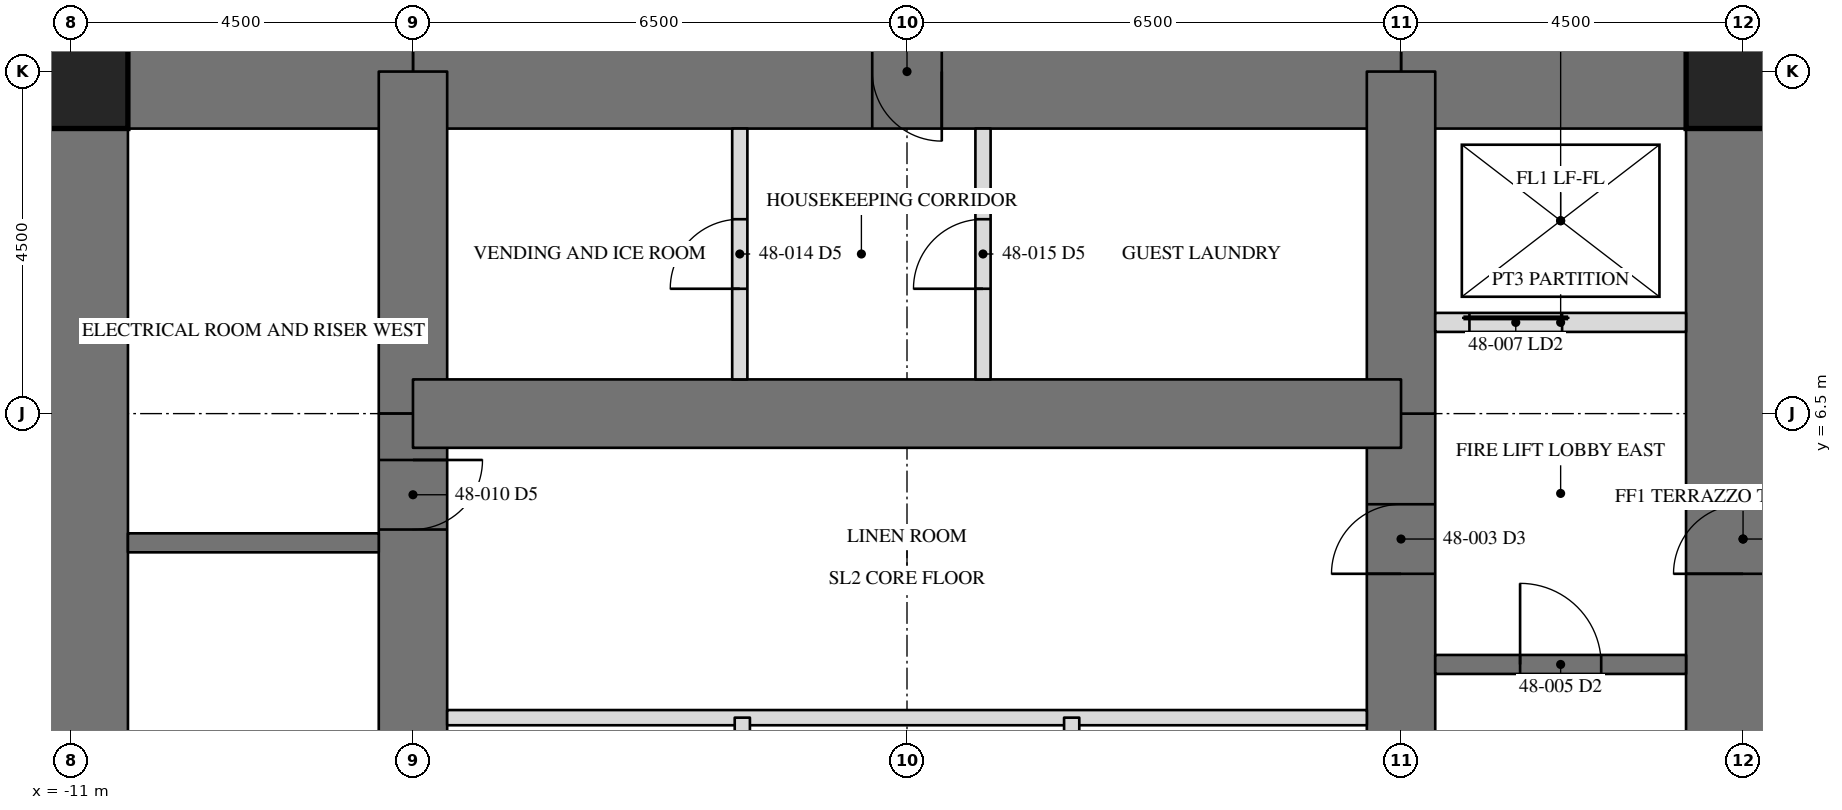
"""IFC4 building model, lengths in metres.
Left out: names, types, materials, properties, quantities, classifications, styles, units other than length and angle.
Written with IfcOpenShell. Run it as: python <this file> out.ifc"""

import sys

from ifc_helpers import new_model, si_unit, direction, frame, frame_2d, origin, origin_2d, place, context, subcontext, project, spatial, rectangle, hollow_rectangle, extrude, element, fill, save


model = new_model("IFC4")
c1 = context("Model", 3, precision=1e-05, world=origin(), true_north=direction((0.0, 1.0)))
c2 = subcontext(c1, "Body", "Model", "MODEL_VIEW")
j1 = project(units=[si_unit("LENGTHUNIT", "METRE"), si_unit("PLANEANGLEUNIT", "RADIAN")], contexts=[c1])
p1 = place(None, origin())
s1 = spatial("IfcSite", under=j1, at=p1, CompositionType="ELEMENT")
p2 = place(p1, origin())
s2 = spatial("IfcBuilding", under=s1, at=p2, CompositionType="ELEMENT")
p3 = place(p2, frame((0.0, 0.0, 204.7)))
s3 = spatial("IfcBuildingStorey", under=s2, at=p3, CompositionType="ELEMENT", Elevation=204.7)
p4 = place(p3, frame((11.0, -11.0, 0.0), z_axis=(0.0, 0.0, 1.0), x_axis=(0.0, 1.0, 0.0)))
e1 = element("IfcWall", 1, at=p4, inside=s3, PredefinedType="SHEAR", context=c2, shape_type="SweptSolid", body=[
    extrude(rectangle(XDim=22.0, YDim=1.5, at=frame_2d((11.0, 0.0))), origin(), (0.0, 0.0, 1.0), 3.5),
])
p5 = place(p4, frame((15.393, 0.0, 0.0)))
e2 = element("IfcOpeningElement", 2, at=p5, cuts=e1, PredefinedType="OPENING", context=c2, shape_type="SweptSolid", body=[
    extrude(rectangle(XDim=0.915, YDim=2.134, at=frame_2d((0.458, 1.067))), frame((0.0, 0.76, 0.0), z_axis=(0.0, -1.0, 0.0), x_axis=(1.0, 0.0, 0.0)), (0.0, 0.0, 1.0), 1.52),
])
p6 = place(p3, frame((-11.0, 11.0, 0.0), z_axis=(0.0, 0.0, 1.0), x_axis=(0.0, -1.0, 0.0)))
e3 = element("IfcWall", 3, at=p6, inside=s3, PredefinedType="SHEAR", context=c2, shape_type="SweptSolid", body=[
    extrude(rectangle(XDim=22.0, YDim=1.5, at=frame_2d((11.0, 0.0))), origin(), (0.0, 0.0, 1.0), 3.5),
])
p7 = place(p6, frame((15.393, 0.0, 0.0)))
e4 = element("IfcOpeningElement", 4, at=p7, cuts=e3, PredefinedType="OPENING", context=c2, shape_type="SweptSolid", body=[
    extrude(rectangle(XDim=0.915, YDim=2.134, at=frame_2d((0.458, 1.067))), frame((0.0, 0.76, 0.0), z_axis=(0.0, -1.0, 0.0), x_axis=(1.0, 0.0, 0.0)), (0.0, 0.0, 1.0), 1.52),
])
p8 = place(p3, frame((11.0, 11.0, 0.0), z_axis=(0.0, 0.0, 1.0), x_axis=(-1.0, 0.0, 0.0)))
e5 = element("IfcWall", 5, at=p8, inside=s3, PredefinedType="SHEAR", context=c2, shape_type="SweptSolid", body=[
    extrude(rectangle(XDim=4.5, YDim=1.5, at=frame_2d((2.25, 0.0))), origin(), (0.0, 0.0, 1.0), 3.5),
])
p9 = place(p3, frame((6.5, 11.0, 0.0), z_axis=(0.0, 0.0, 1.0), x_axis=(-1.0, 0.0, 0.0)))
e6 = element("IfcWall", 6, at=p9, inside=s3, PredefinedType="SHEAR", context=c2, shape_type="SweptSolid", body=[
    extrude(rectangle(XDim=13.0, YDim=1.5, at=frame_2d((6.5, 0.0))), origin(), (0.0, 0.0, 1.0), 3.5),
])
p10 = place(p9, frame((6.042, 0.0, 0.0)))
e7 = element("IfcOpeningElement", 7, at=p10, cuts=e6, PredefinedType="OPENING", context=c2, shape_type="SweptSolid", body=[
    extrude(rectangle(XDim=0.915, YDim=2.134, at=frame_2d((0.458, 1.067))), frame((0.0, 0.76, 0.0), z_axis=(0.0, -1.0, 0.0), x_axis=(1.0, 0.0, 0.0)), (0.0, 0.0, 1.0), 1.52),
])
p11 = place(p3, frame((-6.5, 11.0, 0.0), z_axis=(0.0, 0.0, 1.0), x_axis=(-1.0, 0.0, 0.0)))
e8 = element("IfcWall", 8, at=p11, inside=s3, PredefinedType="SHEAR", context=c2, shape_type="SweptSolid", body=[
    extrude(rectangle(XDim=4.5, YDim=1.5, at=frame_2d((2.25, 0.0))), origin(), (0.0, 0.0, 1.0), 3.5),
])
p12 = place(p3, frame((6.5, -6.5, 0.0), z_axis=(0.0, 0.0, 1.0), x_axis=(0.0, 1.0, 0.0)))
e9 = element("IfcWall", 9, at=p12, inside=s3, PredefinedType="SHEAR", context=c2, shape_type="SweptSolid", body=[
    extrude(rectangle(XDim=13.0, YDim=0.9, at=frame_2d((6.5, 0.0))), origin(), (0.0, 0.0, 1.0), 3.5),
])
p13 = place(p12, frame((10.893, 0.0, 0.0)))
e10 = element("IfcOpeningElement", 10, at=p13, cuts=e9, PredefinedType="OPENING", context=c2, shape_type="SweptSolid", body=[
    extrude(rectangle(XDim=0.915, YDim=2.134, at=frame_2d((0.458, 1.067))), frame((0.0, 0.46, 0.0), z_axis=(0.0, -1.0, 0.0), x_axis=(1.0, 0.0, 0.0)), (0.0, 0.0, 1.0), 0.92),
])
p14 = place(p12, frame((0.61, 0.0, 0.0)))
e11 = element("IfcOpeningElement", 11, at=p14, cuts=e9, PredefinedType="OPENING", context=c2, shape_type="SweptSolid", body=[
    extrude(rectangle(XDim=0.915, YDim=2.134, at=frame_2d((0.458, 1.067))), frame((0.0, 0.46, 0.0), z_axis=(0.0, -1.0, 0.0), x_axis=(1.0, 0.0, 0.0)), (0.0, 0.0, 1.0), 0.92),
])
for number, where, z_axis, x_axis in (
    (12, (6.5, 6.5, 0.0), (0.0, 0.0, 1.0), (0.0, 1.0, 0.0)),
    (13, (-6.5, 11.0, 0.0), (0.0, 0.0, 1.0), (0.0, -1.0, 0.0)),
):
    element("IfcWall", number, at=place(p3, frame(where, z_axis=z_axis, x_axis=x_axis)), inside=s3, PredefinedType="SHEAR", context=c2, shape_type="SweptSolid", body=[
        extrude(rectangle(XDim=4.5, YDim=0.9, at=frame_2d((2.25, 0.0))), origin(), (0.0, 0.0, 1.0), 3.5),
    ])
p15 = place(p3, frame((-6.5, 6.5, 0.0), z_axis=(0.0, 0.0, 1.0), x_axis=(0.0, -1.0, 0.0)))
e14 = element("IfcWall", 14, at=p15, inside=s3, PredefinedType="SHEAR", context=c2, shape_type="SweptSolid", body=[
    extrude(rectangle(XDim=13.0, YDim=0.9, at=frame_2d((6.5, 0.0))), origin(), (0.0, 0.0, 1.0), 3.5),
])
p16 = place(p15, frame((10.893, 0.0, 0.0)))
e15 = element("IfcOpeningElement", 15, at=p16, cuts=e14, PredefinedType="OPENING", context=c2, shape_type="SweptSolid", body=[
    extrude(rectangle(XDim=0.915, YDim=2.134, at=frame_2d((0.458, 1.067))), frame((0.0, 0.46, 0.0), z_axis=(0.0, -1.0, 0.0), x_axis=(1.0, 0.0, 0.0)), (0.0, 0.0, 1.0), 0.92),
])
p17 = place(p15, frame((0.61, 0.0, 0.0)))
e16 = element("IfcOpeningElement", 16, at=p17, cuts=e14, PredefinedType="OPENING", context=c2, shape_type="SweptSolid", body=[
    extrude(rectangle(XDim=0.915, YDim=2.134, at=frame_2d((0.458, 1.067))), frame((0.0, 0.46, 0.0), z_axis=(0.0, -1.0, 0.0), x_axis=(1.0, 0.0, 0.0)), (0.0, 0.0, 1.0), 0.92),
])
p18 = place(p3, frame((6.5, 6.5, 0.0), z_axis=(0.0, 0.0, 1.0), x_axis=(-1.0, 0.0, 0.0)))
e17 = element("IfcWall", 17, at=p18, inside=s3, PredefinedType="SHEAR", context=c2, shape_type="SweptSolid", body=[
    extrude(rectangle(XDim=13.0, YDim=0.9, at=frame_2d((6.5, 0.0))), origin(), (0.0, 0.0, 1.0), 3.5),
])
for number, where, z_axis, x_axis in (
    (18, (11.0, 11.0, 0.0), (0.0, 0.0, 1.0), (1.0, 0.0, 0.0)),
    (19, (-11.0, 11.0, 0.0), (0.0, 0.0, 1.0), (1.0, 0.0, 0.0)),
):
    element("IfcColumn", number, at=place(p3, frame(where, z_axis=z_axis, x_axis=x_axis)), inside=s3, PredefinedType="COLUMN", context=c2, shape_type="SweptSolid", body=[
        extrude(hollow_rectangle(XDim=1.499, YDim=1.499, WallThickness=0.102, at=origin_2d()), origin(), (0.0, 0.0, 1.0), 3.5),
    ])
p19 = place(p3, frame((-6.95, 4.8, 0.0), z_axis=(0.0, 0.0, 1.0), x_axis=(-1.0, 0.0, 0.0)))
e20 = element("IfcWall", 20, at=p19, inside=s3, PredefinedType="SOLIDWALL", context=c2, shape_type="SweptSolid", body=[
    extrude(rectangle(XDim=3.3, YDim=0.25, at=frame_2d((1.65, 0.0))), origin(), (0.0, 0.0, 1.0), 3.31),
])
p20 = place(p3, frame((6.95, 3.2, 0.0), z_axis=(0.0, 0.0, 1.0), x_axis=(1.0, 0.0, 0.0)))
e21 = element("IfcWall", 21, at=p20, inside=s3, PredefinedType="SOLIDWALL", context=c2, shape_type="SweptSolid", body=[
    extrude(rectangle(XDim=3.3, YDim=0.25, at=frame_2d((1.65, 0.0))), origin(), (0.0, 0.0, 1.0), 3.31),
])
p21 = place(p20, frame((1.116, 0.0, 0.0)))
e22 = element("IfcOpeningElement", 22, at=p21, cuts=e21, PredefinedType="OPENING", context=c2, shape_type="SweptSolid", body=[
    extrude(rectangle(XDim=1.067, YDim=2.134, at=frame_2d((0.533, 1.067))), frame((0.0, 0.135, 0.0), z_axis=(0.0, -1.0, 0.0), x_axis=(1.0, 0.0, 0.0)), (0.0, 0.0, 1.0), 0.27),
])
p22 = place(p3, frame((6.95, 7.7, 0.0), z_axis=(0.0, 0.0, 1.0), x_axis=(1.0, 0.0, 0.0)))
e23 = element("IfcWall", 23, at=p22, inside=s3, PredefinedType="PARTITIONING", context=c2, shape_type="SweptSolid", body=[
    extrude(rectangle(XDim=3.3, YDim=0.25, at=frame_2d((1.65, 0.0))), origin(), (0.0, 0.0, 1.0), 3.31),
])
p23 = place(p22, frame((0.45, 0.0, 0.0)))
e24 = element("IfcOpeningElement", 24, at=p23, cuts=e23, PredefinedType="OPENING", context=c2, shape_type="SweptSolid", body=[
    extrude(rectangle(XDim=1.219, YDim=2.134, at=frame_2d((0.609, 1.067))), frame((0.0, 0.135, 0.0), z_axis=(0.0, -1.0, 0.0), x_axis=(1.0, 0.0, 0.0)), (0.0, 0.0, 1.0), 0.27),
])
p24 = place(p3, frame((-6.05, 2.5, 0.0), z_axis=(0.0, 0.0, 1.0), x_axis=(1.0, 0.0, 0.0)))
e25 = element("IfcWall", 25, at=p24, inside=s3, PredefinedType="PARTITIONING", context=c2, shape_type="SweptSolid", body=[
    extrude(rectangle(XDim=12.1, YDim=0.2, at=frame_2d((6.05, 0.0))), origin(), (0.0, 0.0, 1.0), 3.31),
])
for number, where, z_axis, x_axis in (
    (26, (-2.167, -2.5, 0.0), (0.0, 0.0, 1.0), (0.0, 1.0, 0.0)),
    (27, (2.167, -2.5, 0.0), (0.0, 0.0, 1.0), (0.0, 1.0, 0.0)),
):
    element("IfcWall", number, at=place(p3, frame(where, z_axis=z_axis, x_axis=x_axis)), inside=s3, PredefinedType="PARTITIONING", context=c2, shape_type="SweptSolid", body=[
        extrude(rectangle(XDim=5.0, YDim=0.2, at=frame_2d((2.5, 0.0))), origin(), (0.0, 0.0, 1.0), 3.31),
    ])
p25 = place(p3, frame((-2.2, 6.95, 0.0), z_axis=(0.0, 0.0, 1.0), x_axis=(0.0, 1.0, 0.0)))
e28 = element("IfcWall", 28, at=p25, inside=s3, PredefinedType="PARTITIONING", context=c2, shape_type="SweptSolid", body=[
    extrude(rectangle(XDim=3.3, YDim=0.2, at=frame_2d((1.65, 0.0))), origin(), (0.0, 0.0, 1.0), 3.31),
])
p26 = place(p25, frame((1.192, 0.0, 0.0)))
e29 = element("IfcOpeningElement", 29, at=p26, cuts=e28, PredefinedType="OPENING", context=c2, shape_type="SweptSolid", body=[
    extrude(rectangle(XDim=0.915, YDim=2.134, at=frame_2d((0.458, 1.067))), frame((0.0, 0.11, 0.0), z_axis=(0.0, -1.0, 0.0), x_axis=(1.0, 0.0, 0.0)), (0.0, 0.0, 1.0), 0.22),
])
p27 = place(p3, frame((1.0, 6.95, 0.0), z_axis=(0.0, 0.0, 1.0), x_axis=(0.0, 1.0, 0.0)))
e30 = element("IfcWall", 30, at=p27, inside=s3, PredefinedType="PARTITIONING", context=c2, shape_type="SweptSolid", body=[
    extrude(rectangle(XDim=3.3, YDim=0.2, at=frame_2d((1.65, 0.0))), origin(), (0.0, 0.0, 1.0), 3.31),
])
p28 = place(p27, frame((1.192, 0.0, 0.0)))
e31 = element("IfcOpeningElement", 31, at=p28, cuts=e30, PredefinedType="OPENING", context=c2, shape_type="SweptSolid", body=[
    extrude(rectangle(XDim=0.915, YDim=2.134, at=frame_2d((0.458, 1.067))), frame((0.0, 0.11, 0.0), z_axis=(0.0, -1.0, 0.0), x_axis=(1.0, 0.0, 0.0)), (0.0, 0.0, 1.0), 0.22),
])
p29 = place(p13, origin())
e32 = element("IfcDoor", 32, at=p29, inside=s3, OperationType="SINGLE_SWING_RIGHT", PredefinedType="DOOR", context=c2, shape_type="SweptSolid", body=[
    extrude(rectangle(XDim=0.915, YDim=2.134, at=frame_2d((0.458, 1.067))), frame((0.0, -0.375, 0.0), z_axis=(0.0, -1.0, 0.0), x_axis=(1.0, 0.0, 0.0)), (0.0, 0.0, 1.0), 0.05),
])
fill(e10, e32)
p30 = place(p21, origin())
e33 = element("IfcDoor", 33, at=p30, inside=s3, OperationType="SINGLE_SWING_LEFT", PredefinedType="DOOR", context=c2, shape_type="SweptSolid", body=[
    extrude(rectangle(XDim=1.067, YDim=2.134, at=frame_2d((0.533, 1.067))), frame((0.0, 0.025, 0.0), z_axis=(0.0, -1.0, 0.0), x_axis=(1.0, 0.0, 0.0)), (0.0, 0.0, 1.0), 0.05),
])
fill(e22, e33)
p31 = place(p23, origin())
e34 = element("IfcDoor", 34, at=p31, inside=s3, OperationType="SLIDING_TO_LEFT", PredefinedType="DOOR", context=c2, shape_type="SweptSolid", body=[
    extrude(rectangle(XDim=1.219, YDim=2.134, at=frame_2d((0.609, 1.067))), frame((0.0, 0.025, 0.0), z_axis=(0.0, -1.0, 0.0), x_axis=(1.0, 0.0, 0.0)), (0.0, 0.0, 1.0), 0.05),
])
fill(e24, e34)
p32 = place(p17, origin())
e35 = element("IfcDoor", 35, at=p32, inside=s3, OperationType="SINGLE_SWING_RIGHT", PredefinedType="DOOR", context=c2, shape_type="SweptSolid", body=[
    extrude(rectangle(XDim=0.915, YDim=2.134, at=frame_2d((0.458, 1.067))), frame((0.0, -0.375, 0.0), z_axis=(0.0, -1.0, 0.0), x_axis=(1.0, 0.0, 0.0)), (0.0, 0.0, 1.0), 0.05),
])
fill(e16, e35)
p33 = place(p10, origin())
e36 = element("IfcDoor", 36, at=p33, inside=s3, OperationType="SINGLE_SWING_RIGHT", PredefinedType="DOOR", context=c2, shape_type="SweptSolid", body=[
    extrude(rectangle(XDim=0.915, YDim=2.134, at=frame_2d((0.458, 1.067))), frame((0.0, 0.025, 0.0), z_axis=(0.0, -1.0, 0.0), x_axis=(1.0, 0.0, 0.0)), (0.0, 0.0, 1.0), 0.05),
])
fill(e7, e36)
p34 = place(p26, origin())
e37 = element("IfcDoor", 37, at=p34, inside=s3, OperationType="SINGLE_SWING_RIGHT", PredefinedType="DOOR", context=c2, shape_type="SweptSolid", body=[
    extrude(rectangle(XDim=0.915, YDim=2.134, at=frame_2d((0.458, 1.067))), frame((0.0, 0.025, 0.0), z_axis=(0.0, -1.0, 0.0), x_axis=(1.0, 0.0, 0.0)), (0.0, 0.0, 1.0), 0.05),
])
fill(e29, e37)
p35 = place(p28, origin())
e38 = element("IfcDoor", 38, at=p35, inside=s3, OperationType="SINGLE_SWING_RIGHT", PredefinedType="DOOR", context=c2, shape_type="SweptSolid", body=[
    extrude(rectangle(XDim=0.915, YDim=2.134, at=frame_2d((0.458, 1.067))), frame((0.0, 0.025, 0.0), z_axis=(0.0, -1.0, 0.0), x_axis=(1.0, 0.0, 0.0)), (0.0, 0.0, 1.0), 0.05),
])
fill(e31, e38)
save(model, sys.argv[1])
